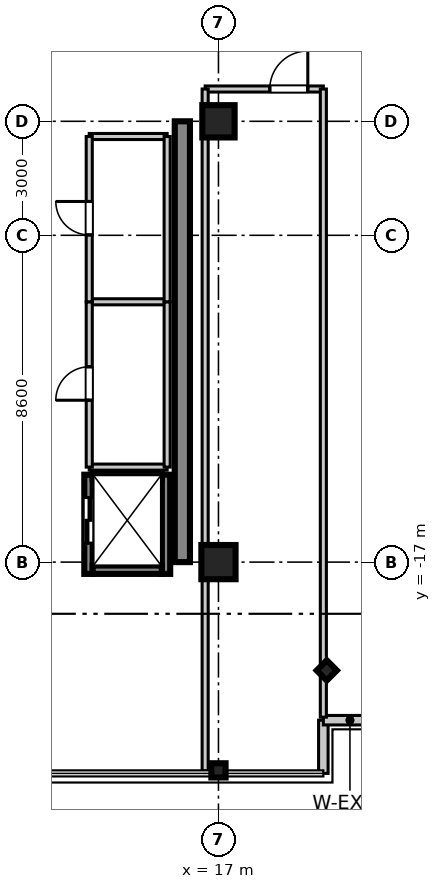
"""IFC4 building model, lengths in metres.
Left out: names, types, materials, properties, quantities, classifications, styles, units other than length and angle.
Written with IfcOpenShell. Run it as: python <this file> out.ifc"""

import sys

from ifc_helpers import new_model, si_unit, direction, frame, frame_2d, origin, origin_2d, place, context, subcontext, project, spatial, rectangle, i_section, extrude, source, transform, mapped, element, fill, save


model = new_model("IFC4")
c1 = context("Model", 3, precision=1e-05, world=origin(), true_north=direction((0.0, 1.0)))
c2 = subcontext(c1, "Body", "Model", "MODEL_VIEW")
j1 = project(units=[si_unit("LENGTHUNIT", "METRE"), si_unit("PLANEANGLEUNIT", "RADIAN")], contexts=[c1])
p1 = place(None, origin())
s1 = spatial("IfcSite", under=j1, at=p1, CompositionType="ELEMENT")
p2 = place(p1, origin())
s2 = spatial("IfcBuilding", under=s1, at=p2, CompositionType="ELEMENT")
p3 = place(p2, frame((0.0, 0.0, 288.8)))
s3 = spatial("IfcBuildingStorey", under=s2, at=p3, CompositionType="ELEMENT", Elevation=288.8)
m1 = source(origin(), c2, "Body", "SweptSolid", [
    extrude(rectangle(XDim=0.9, YDim=0.9, at=origin_2d()), origin(), (0.0, 0.0, 1.0), 3.805),
])
p4 = place(p3, frame((17.0, -17.0, 0.0), z_axis=(0.0, 0.0, 1.0), x_axis=(1.0, 0.0, 0.0)))
e1 = element("IfcColumn", 1, at=p4, inside=s3, PredefinedType="COLUMN", context=c2, shape_type="MappedRepresentation", body=[
    mapped(m1, transform((0.0, 0.0, 0.0), scale=1.0)),
])
m2 = source(origin(), c2, "Body", "SweptSolid", [
    extrude(rectangle(XDim=0.85, YDim=0.85, at=origin_2d()), origin(), (0.0, 0.0, 1.0), 3.805),
])
p5 = place(p3, frame((17.0, -5.4, 0.0), z_axis=(0.0, 0.0, 1.0), x_axis=(1.0, 0.0, 0.0)))
e2 = element("IfcColumn", 2, at=p5, inside=s3, PredefinedType="PILASTER", context=c2, shape_type="MappedRepresentation", body=[
    mapped(m2, transform((0.0, 0.0, 0.0), scale=1.0)),
])
m3 = source(origin(), c2, "Body", "SweptSolid", [
    extrude(i_section(OverallWidth=0.374, OverallDepth=0.374, WebThickness=0.014, FlangeThickness=0.023, at=origin_2d()), origin(), (0.0, 0.0, 1.0), 3.805),
])
for number, where, z_axis, x_axis in (
    (3, (17.0, -22.48, 0.0), (0.0, 0.0, 1.0), (0.0, 1.0, 0.0)),
    (4, (19.85, -19.85, 0.0), (0.0, 0.0, 1.0), (0.707, 0.707, 0.0)),
):
    element("IfcColumn", number, at=place(p3, frame(where, z_axis=z_axis, x_axis=x_axis)), inside=s3, PredefinedType="COLUMN", context=c2, shape_type="MappedRepresentation", body=[
        mapped(m3, transform((0.0, 0.0, 0.0), scale=1.0)),
    ])
m4 = source(origin(), c2, "Body", "SweptSolid", [
    extrude(rectangle(XDim=11.6, YDim=0.4, at=frame_2d((5.8, 0.0))), origin(), (0.0, 0.0, 1.0), 3.55),
])
p6 = place(p3, frame((16.05, -17.0, 0.0), z_axis=(0.0, 0.0, 1.0), x_axis=(0.0, 1.0, 0.0)))
e5 = element("IfcWall", 5, at=p6, inside=s3, PredefinedType="SHEAR", context=c2, shape_type="MappedRepresentation", body=[
    mapped(m4, transform((0.0, 0.0, 0.0), scale=1.0)),
])
m5 = source(origin(), c2, "Body", "SweptSolid", [
    extrude(rectangle(XDim=2.61, YDim=0.22, at=frame_2d((1.305, 0.0))), origin(), (0.0, 0.0, 1.0), 3.55),
])
p7 = place(p3, frame((13.58, -17.31, 0.0), z_axis=(0.0, 0.0, 1.0), x_axis=(0.0, 1.0, 0.0)))
e6 = element("IfcWall", 6, at=p7, inside=s3, PredefinedType="SHEAR", context=c2, shape_type="MappedRepresentation", body=[
    mapped(m5, transform((0.0, 0.0, 0.0), scale=1.0)),
])
p8 = place(p7, frame((0.81, 0.0, 0.0)))
e7 = element("IfcOpeningElement", 7, at=p8, cuts=e6, PredefinedType="OPENING", context=c2, shape_type="SweptSolid", body=[
    extrude(rectangle(XDim=1.2, YDim=2.2, at=frame_2d((0.6, 1.1))), frame((0.0, 0.12, 0.0), z_axis=(0.0, -1.0, 0.0), x_axis=(1.0, 0.0, 0.0)), (0.0, 0.0, 1.0), 0.24),
])
p9 = place(p3, frame((15.62, -17.31, 0.0), z_axis=(0.0, 0.0, 1.0), x_axis=(0.0, 1.0, 0.0)))
e8 = element("IfcWall", 8, at=p9, inside=s3, PredefinedType="SHEAR", context=c2, shape_type="MappedRepresentation", body=[
    mapped(m5, transform((0.0, 0.0, 0.0), scale=1.0)),
])
m6 = source(origin(), c2, "Body", "SweptSolid", [
    extrude(rectangle(XDim=1.82, YDim=0.22, at=frame_2d((0.91, 0.0))), origin(), (0.0, 0.0, 1.0), 3.55),
])
p10 = place(p3, frame((13.69, -17.2, 0.0), z_axis=(0.0, 0.0, 1.0), x_axis=(1.0, 0.0, 0.0)))
e9 = element("IfcWall", 9, at=p10, inside=s3, PredefinedType="SHEAR", context=c2, shape_type="MappedRepresentation", body=[
    mapped(m6, transform((0.0, 0.0, 0.0), scale=1.0)),
])
m7 = source(origin(), c2, "Body", "SweptSolid", [
    extrude(rectangle(XDim=1.82, YDim=0.22, at=frame_2d((0.91, 0.0))), origin(), (0.0, 0.0, 1.0), 3.85),
])
p11 = place(p3, frame((13.69, -14.7, 0.0), z_axis=(0.0, 0.0, 1.0), x_axis=(1.0, 0.0, 0.0)))
e10 = element("IfcWall", 10, at=p11, inside=s3, PredefinedType="SHEAR", context=c2, shape_type="MappedRepresentation", body=[
    mapped(m7, transform((0.0, 0.0, 0.0), scale=1.0)),
])
m8 = source(origin(), c2, "Body", "SweptSolid", [
    extrude(rectangle(XDim=1.4, YDim=0.25, at=frame_2d((0.7, 0.0))), origin(), (0.0, 0.0, 1.0), 3.55),
])
p12 = place(p3, frame((19.76, -22.56, 0.0), z_axis=(0.0, 0.0, 1.0), x_axis=(0.0, 1.0, 0.0)))
e11 = element("IfcWall", 11, at=p12, inside=s3, PredefinedType="STANDARD", context=c2, shape_type="MappedRepresentation", body=[
    mapped(m8, transform((0.0, 0.0, 0.0), scale=1.0)),
])
m9 = source(origin(), c2, "Body", "SweptSolid", [
    extrude(rectangle(XDim=1.4, YDim=0.25, at=frame_2d((0.7, 0.0))), origin(), (0.0, 0.0, 1.0), 3.55),
])
p13 = place(p3, frame((19.76, -21.16, 0.0), z_axis=(0.0, 0.0, 1.0), x_axis=(1.0, 0.0, 0.0)))
e12 = element("IfcWall", 12, at=p13, inside=s3, PredefinedType="STANDARD", context=c2, shape_type="MappedRepresentation", body=[
    mapped(m9, transform((0.0, 0.0, 0.0), scale=1.0)),
])
m10 = source(origin(), c2, "Body", "SweptSolid", [
    extrude(rectangle(XDim=2.05, YDim=0.16, at=frame_2d((1.025, 0.0))), origin(), (0.0, 0.0, 1.0), 2.89),
])
for number, where, z_axis, x_axis in (
    (13, (13.6, -14.5, 0.0), (0.0, 0.0, 1.0), (1.0, 0.0, 0.0)),
    (14, (13.6, -10.15, 0.0), (0.0, 0.0, 1.0), (1.0, 0.0, 0.0)),
):
    element("IfcWall", number, at=place(p3, frame(where, z_axis=z_axis, x_axis=x_axis)), inside=s3, PredefinedType="PARTITIONING", context=c2, shape_type="MappedRepresentation", body=[
        mapped(m10, transform((0.0, 0.0, 0.0), scale=1.0)),
    ])
m11 = source(origin(), c2, "Body", "SweptSolid", [
    extrude(rectangle(XDim=4.35, YDim=0.16, at=frame_2d((2.175, 0.0))), origin(), (0.0, 0.0, 1.0), 2.89),
])
p14 = place(p3, frame((13.6, -14.5, 0.0), z_axis=(0.0, 0.0, 1.0), x_axis=(0.0, 1.0, 0.0)))
e15 = element("IfcWall", 15, at=p14, inside=s3, PredefinedType="PARTITIONING", context=c2, shape_type="MappedRepresentation", body=[
    mapped(m11, transform((0.0, 0.0, 0.0), scale=1.0)),
])
p15 = place(p14, frame((1.76, 0.0, 0.0)))
e16 = element("IfcOpeningElement", 16, at=p15, cuts=e15, PredefinedType="OPENING", context=c2, shape_type="SweptSolid", body=[
    extrude(rectangle(XDim=0.88, YDim=2.1, at=frame_2d((0.44, 1.05))), frame((0.0, 0.09, 0.0), z_axis=(0.0, -1.0, 0.0), x_axis=(1.0, 0.0, 0.0)), (0.0, 0.0, 1.0), 0.18),
])
p16 = place(p3, frame((15.65, -14.5, 0.0), z_axis=(0.0, 0.0, 1.0), x_axis=(0.0, 1.0, 0.0)))
e17 = element("IfcWall", 17, at=p16, inside=s3, PredefinedType="PARTITIONING", context=c2, shape_type="MappedRepresentation", body=[
    mapped(m11, transform((0.0, 0.0, 0.0), scale=1.0)),
])
p17 = place(p3, frame((13.6, -5.8, 0.0), z_axis=(0.0, 0.0, 1.0), x_axis=(1.0, 0.0, 0.0)))
e18 = element("IfcWall", 18, at=p17, inside=s3, PredefinedType="PARTITIONING", context=c2, shape_type="MappedRepresentation", body=[
    mapped(m10, transform((0.0, 0.0, 0.0), scale=1.0)),
])
m12 = source(origin(), c2, "Body", "SweptSolid", [
    extrude(rectangle(XDim=4.35, YDim=0.16, at=frame_2d((2.175, 0.0))), origin(), (0.0, 0.0, 1.0), 2.89),
])
p18 = place(p3, frame((13.6, -10.15, 0.0), z_axis=(0.0, 0.0, 1.0), x_axis=(0.0, 1.0, 0.0)))
e19 = element("IfcWall", 19, at=p18, inside=s3, PredefinedType="PARTITIONING", context=c2, shape_type="MappedRepresentation", body=[
    mapped(m12, transform((0.0, 0.0, 0.0), scale=1.0)),
])
p19 = place(p18, frame((1.76, 0.0, 0.0)))
e20 = element("IfcOpeningElement", 20, at=p19, cuts=e19, PredefinedType="OPENING", context=c2, shape_type="SweptSolid", body=[
    extrude(rectangle(XDim=0.88, YDim=2.1, at=frame_2d((0.44, 1.05))), frame((0.0, 0.09, 0.0), z_axis=(0.0, -1.0, 0.0), x_axis=(1.0, 0.0, 0.0)), (0.0, 0.0, 1.0), 0.18),
])
p20 = place(p3, frame((15.65, -10.15, 0.0), z_axis=(0.0, 0.0, 1.0), x_axis=(0.0, 1.0, 0.0)))
e21 = element("IfcWall", 21, at=p20, inside=s3, PredefinedType="PARTITIONING", context=c2, shape_type="MappedRepresentation", body=[
    mapped(m12, transform((0.0, 0.0, 0.0), scale=1.0)),
])
m13 = source(origin(), c2, "Body", "SweptSolid", [
    extrude(rectangle(XDim=3.11, YDim=0.16, at=frame_2d((1.555, 0.0))), origin(), (0.0, 0.0, 1.0), 2.89),
])
p21 = place(p3, frame((16.65, -4.55, 0.0), z_axis=(0.0, 0.0, 1.0), x_axis=(1.0, 0.0, 0.0)))
e22 = element("IfcWall", 22, at=p21, inside=s3, PredefinedType="PARTITIONING", context=c2, shape_type="MappedRepresentation", body=[
    mapped(m13, transform((0.0, 0.0, 0.0), scale=1.0)),
])
p22 = place(p21, frame((1.701, 0.0, 0.0)))
e23 = element("IfcOpeningElement", 23, at=p22, cuts=e22, PredefinedType="OPENING", context=c2, shape_type="SweptSolid", body=[
    extrude(rectangle(XDim=1.0, YDim=2.1, at=frame_2d((0.5, 1.05))), frame((0.0, 0.09, 0.0), z_axis=(0.0, -1.0, 0.0), x_axis=(1.0, 0.0, 0.0)), (0.0, 0.0, 1.0), 0.18),
])
m14 = source(origin(), c2, "Body", "SweptSolid", [
    extrude(rectangle(XDim=17.95, YDim=0.16, at=frame_2d((8.975, 0.0))), origin(), (0.0, 0.0, 1.0), 2.89),
])
p23 = place(p3, frame((16.65, -22.5, 0.0), z_axis=(0.0, 0.0, 1.0), x_axis=(0.0, 1.0, 0.0)))
e24 = element("IfcWall", 24, at=p23, inside=s3, PredefinedType="PARTITIONING", context=c2, shape_type="MappedRepresentation", body=[
    mapped(m14, transform((0.0, 0.0, 0.0), scale=1.0)),
])
m15 = source(origin(), c2, "Body", "SweptSolid", [
    extrude(rectangle(XDim=16.53, YDim=0.16, at=frame_2d((8.265, 0.0))), origin(), (0.0, 0.0, 1.0), 2.89),
])
p24 = place(p3, frame((19.76, -21.08, 0.0), z_axis=(0.0, 0.0, 1.0), x_axis=(0.0, 1.0, 0.0)))
e25 = element("IfcWall", 25, at=p24, inside=s3, PredefinedType="PARTITIONING", context=c2, shape_type="MappedRepresentation", body=[
    mapped(m15, transform((0.0, 0.0, 0.0), scale=1.0)),
])
m16 = source(origin(), c2, "Body", "SweptSolid", [
    extrude(rectangle(XDim=1.2, YDim=2.2, at=frame_2d((0.6, 1.1))), frame((0.0, 0.025, 0.0), z_axis=(0.0, -1.0, 0.0), x_axis=(1.0, 0.0, 0.0)), (0.0, 0.0, 1.0), 0.05),
])
p25 = place(p8, origin())
e26 = element("IfcDoor", 26, at=p25, inside=s3, OperationType="DOUBLE_DOOR_SLIDING", PredefinedType="DOOR", context=c2, shape_type="MappedRepresentation", body=[
    mapped(m16, transform((0.0, 0.0, 0.0), scale=1.0)),
])
fill(e7, e26)
m17 = source(origin(), c2, "Body", "SweptSolid", [
    extrude(rectangle(XDim=0.88, YDim=2.1, at=frame_2d((0.44, 1.05))), frame((0.0, 0.025, 0.0), z_axis=(0.0, -1.0, 0.0), x_axis=(1.0, 0.0, 0.0)), (0.0, 0.0, 1.0), 0.05),
])
p26 = place(p15, frame((0.88, 0.0, 0.0), z_axis=(0.0, 0.0, 1.0), x_axis=(-1.0, 0.0, 0.0)))
e27 = element("IfcDoor", 27, at=p26, inside=s3, OperationType="SINGLE_SWING_LEFT", PredefinedType="DOOR", context=c2, shape_type="MappedRepresentation", body=[
    mapped(m17, transform((0.0, 0.0, 0.0), scale=1.0)),
])
fill(e16, e27)
p27 = place(p19, frame((0.88, 0.0, 0.0), z_axis=(0.0, 0.0, 1.0), x_axis=(-1.0, 0.0, 0.0)))
e28 = element("IfcDoor", 28, at=p27, inside=s3, OperationType="SINGLE_SWING_RIGHT", PredefinedType="DOOR", context=c2, shape_type="MappedRepresentation", body=[
    mapped(m17, transform((0.0, 0.0, 0.0), scale=1.0)),
])
fill(e20, e28)
m18 = source(origin(), c2, "Body", "SweptSolid", [
    extrude(rectangle(XDim=1.0, YDim=2.1, at=frame_2d((0.5, 1.05))), frame((0.0, 0.025, 0.0), z_axis=(0.0, -1.0, 0.0), x_axis=(1.0, 0.0, 0.0)), (0.0, 0.0, 1.0), 0.05),
])
p28 = place(p22, frame((1.0, 0.0, 0.0), z_axis=(0.0, 0.0, 1.0), x_axis=(-1.0, 0.0, 0.0)))
e29 = element("IfcDoor", 29, at=p28, inside=s3, OperationType="SINGLE_SWING_RIGHT", PredefinedType="DOOR", context=c2, shape_type="MappedRepresentation", body=[
    mapped(m18, transform((0.0, 0.0, 0.0), scale=1.0)),
])
fill(e23, e29)
save(model, sys.argv[1])
